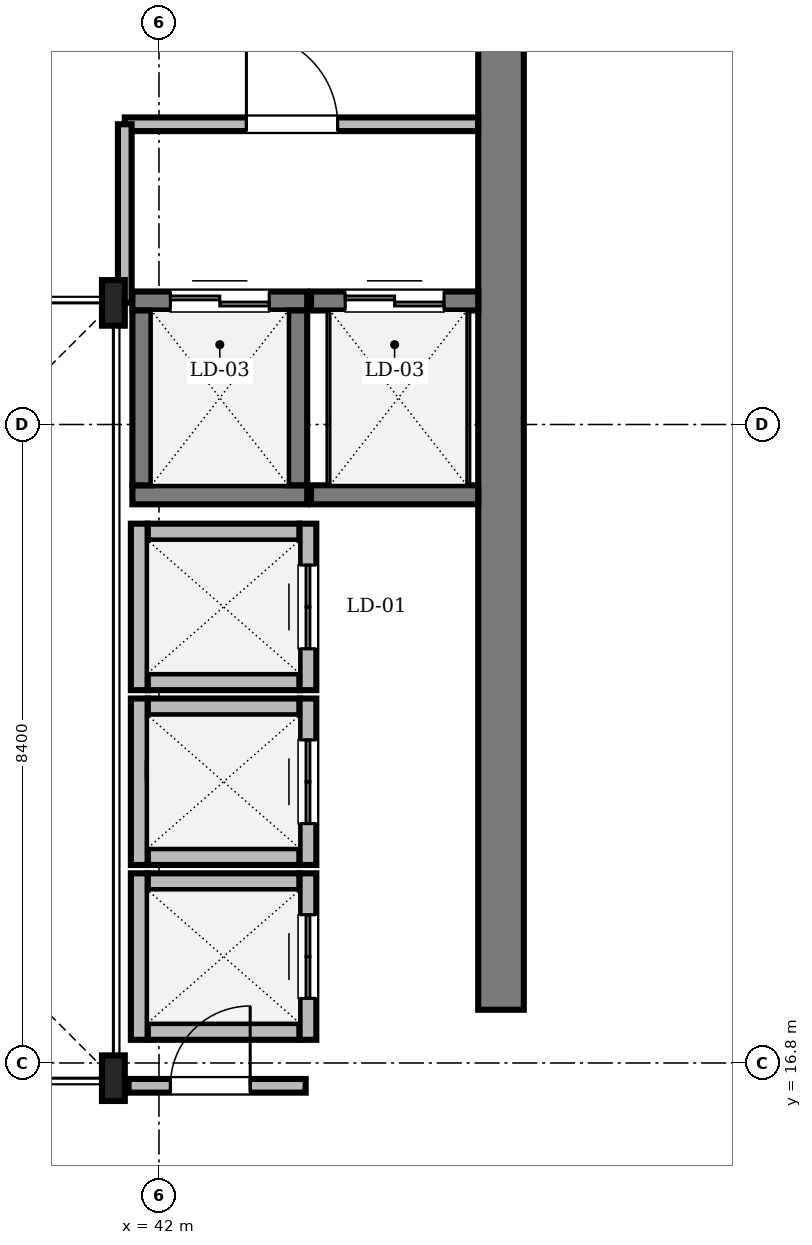
"""IFC4 building model, lengths in metres.
Left out: names, types, materials, properties, quantities, classifications, styles, units other than length and angle.
Written with IfcOpenShell. Run it as: python <this file> out.ifc"""

import sys

from ifc_helpers import new_model, si_unit, direction, frame, frame_2d, origin, origin_2d, place, context, subcontext, project, spatial, rectangle, i_section, extrude, source, transform, mapped, element, fill, save


model = new_model("IFC4")
c1 = context("Model", 3, precision=1e-05, world=origin(), true_north=direction((0.0, 1.0)))
c2 = subcontext(c1, "Body", "Model", "MODEL_VIEW")
j1 = project(units=[si_unit("LENGTHUNIT", "METRE"), si_unit("PLANEANGLEUNIT", "RADIAN")], contexts=[c1])
p1 = place(None, origin())
s1 = spatial("IfcSite", under=j1, at=p1, CompositionType="ELEMENT")
p2 = place(p1, origin())
s2 = spatial("IfcBuilding", under=s1, at=p2, CompositionType="ELEMENT")
p3 = place(p2, frame((0.0, 0.0, 262.45)))
s3 = spatial("IfcBuildingStorey", under=s2, at=p3, CompositionType="ELEMENT", Elevation=262.45)
m1 = source(origin(), c2, "Body", "SweptSolid", [
    extrude(rectangle(XDim=13.15, YDim=0.6, at=frame_2d((6.575, 0.0))), origin(), (0.0, 0.0, 1.0), 3.65),
])
p4 = place(p3, frame((46.5, 17.5, 0.0), z_axis=(0.0, 0.0, 1.0), x_axis=(0.0, 1.0, 0.0)))
e1 = element("IfcWall", 1, at=p4, inside=s3, PredefinedType="SHEAR", context=c2, shape_type="MappedRepresentation", body=[
    mapped(m1, transform((0.0, 0.0, 0.0), scale=1.0)),
])
m2 = source(origin(), c2, "Body", "SweptSolid", [
    extrude(i_section(OverallWidth=0.3, OverallDepth=0.6, WebThickness=0.015, FlangeThickness=0.03, FilletRadius=0.027, at=origin_2d()), origin(), (0.0, 0.0, 1.0), 3.65),
])
for number, where, z_axis, x_axis in (
    (2, (41.4, 16.6, 0.0), (0.0, 0.0, 1.0), (1.0, 0.0, 0.0)),
    (3, (41.4, 26.8, 0.0), (0.0, 0.0, 1.0), (1.0, 0.0, 0.0)),
):
    element("IfcColumn", number, at=place(p3, frame(where, z_axis=z_axis, x_axis=x_axis)), inside=s3, PredefinedType="COLUMN", context=c2, shape_type="MappedRepresentation", body=[
        mapped(m2, transform((0.0, 0.0, 0.0), scale=1.0)),
    ])
m3 = source(origin(), c2, "Body", "SweptSolid", [
    extrude(rectangle(XDim=2.0, YDim=0.22, at=frame_2d((1.0, 0.0))), origin(), (0.0, 0.0, 1.0), 3.65),
])
for number, where, z_axis, x_axis in (
    (4, (41.85, 21.815, 0.0), (0.0, 0.0, 1.0), (1.0, 0.0, 0.0)),
    (5, (41.85, 23.785, 0.0), (0.0, 0.0, 1.0), (1.0, 0.0, 0.0)),
):
    element("IfcWall", number, at=place(p3, frame(where, z_axis=z_axis, x_axis=x_axis)), inside=s3, PredefinedType="SOLIDWALL", context=c2, shape_type="MappedRepresentation", body=[
        mapped(m3, transform((0.0, 0.0, 0.0), scale=1.0)),
    ])
m4 = source(origin(), c2, "Body", "SweptSolid", [
    extrude(rectangle(XDim=2.19, YDim=0.22, at=frame_2d((1.095, 0.0))), origin(), (0.0, 0.0, 1.0), 3.65),
])
p5 = place(p3, frame((41.74, 21.705, 0.0), z_axis=(0.0, 0.0, 1.0), x_axis=(0.0, 1.0, 0.0)))
e6 = element("IfcWall", 6, at=p5, inside=s3, PredefinedType="SOLIDWALL", context=c2, shape_type="MappedRepresentation", body=[
    mapped(m4, transform((0.0, 0.0, 0.0), scale=1.0)),
])
p6 = place(p3, frame((43.96, 21.705, 0.0), z_axis=(0.0, 0.0, 1.0), x_axis=(0.0, 1.0, 0.0)))
e7 = element("IfcWall", 7, at=p6, inside=s3, PredefinedType="SOLIDWALL", context=c2, shape_type="MappedRepresentation", body=[
    mapped(m4, transform((0.0, 0.0, 0.0), scale=1.0)),
])
m5 = source(origin(), c2, "Body", "SweptSolid", [
    extrude(rectangle(XDim=1.1, YDim=2.2, at=frame_2d((0.55, 1.1))), frame((0.0, 0.12, 0.0), z_axis=(0.0, -1.0, 0.0), x_axis=(1.0, 0.0, 0.0)), (0.0, 0.0, 1.0), 0.24),
])
p7 = place(p6, frame((0.545, 0.0, 0.0)))
e8 = element("IfcOpeningElement", 8, at=p7, cuts=e7, PredefinedType="OPENING", context=c2, shape_type="MappedRepresentation", body=[
    mapped(m5, transform((0.0, 0.0, 0.0), scale=1.0)),
])
for number, where, z_axis, x_axis in (
    (9, (41.85, 19.515, 0.0), (0.0, 0.0, 1.0), (1.0, 0.0, 0.0)),
    (10, (41.85, 21.485, 0.0), (0.0, 0.0, 1.0), (1.0, 0.0, 0.0)),
):
    element("IfcWall", number, at=place(p3, frame(where, z_axis=z_axis, x_axis=x_axis)), inside=s3, PredefinedType="SOLIDWALL", context=c2, shape_type="MappedRepresentation", body=[
        mapped(m3, transform((0.0, 0.0, 0.0), scale=1.0)),
    ])
p8 = place(p3, frame((41.74, 19.405, 0.0), z_axis=(0.0, 0.0, 1.0), x_axis=(0.0, 1.0, 0.0)))
e11 = element("IfcWall", 11, at=p8, inside=s3, PredefinedType="SOLIDWALL", context=c2, shape_type="MappedRepresentation", body=[
    mapped(m4, transform((0.0, 0.0, 0.0), scale=1.0)),
])
p9 = place(p3, frame((43.96, 19.405, 0.0), z_axis=(0.0, 0.0, 1.0), x_axis=(0.0, 1.0, 0.0)))
e12 = element("IfcWall", 12, at=p9, inside=s3, PredefinedType="SOLIDWALL", context=c2, shape_type="MappedRepresentation", body=[
    mapped(m4, transform((0.0, 0.0, 0.0), scale=1.0)),
])
p10 = place(p9, frame((0.545, 0.0, 0.0)))
e13 = element("IfcOpeningElement", 13, at=p10, cuts=e12, PredefinedType="OPENING", context=c2, shape_type="MappedRepresentation", body=[
    mapped(m5, transform((0.0, 0.0, 0.0), scale=1.0)),
])
for number, where, z_axis, x_axis in (
    (14, (41.85, 17.215, 0.0), (0.0, 0.0, 1.0), (1.0, 0.0, 0.0)),
    (15, (41.85, 19.185, 0.0), (0.0, 0.0, 1.0), (1.0, 0.0, 0.0)),
):
    element("IfcWall", number, at=place(p3, frame(where, z_axis=z_axis, x_axis=x_axis)), inside=s3, PredefinedType="SOLIDWALL", context=c2, shape_type="MappedRepresentation", body=[
        mapped(m3, transform((0.0, 0.0, 0.0), scale=1.0)),
    ])
p11 = place(p3, frame((41.74, 17.105, 0.0), z_axis=(0.0, 0.0, 1.0), x_axis=(0.0, 1.0, 0.0)))
e16 = element("IfcWall", 16, at=p11, inside=s3, PredefinedType="SOLIDWALL", context=c2, shape_type="MappedRepresentation", body=[
    mapped(m4, transform((0.0, 0.0, 0.0), scale=1.0)),
])
p12 = place(p3, frame((43.96, 17.105, 0.0), z_axis=(0.0, 0.0, 1.0), x_axis=(0.0, 1.0, 0.0)))
e17 = element("IfcWall", 17, at=p12, inside=s3, PredefinedType="SOLIDWALL", context=c2, shape_type="MappedRepresentation", body=[
    mapped(m4, transform((0.0, 0.0, 0.0), scale=1.0)),
])
p13 = place(p12, frame((0.545, 0.0, 0.0)))
e18 = element("IfcOpeningElement", 18, at=p13, cuts=e17, PredefinedType="OPENING", context=c2, shape_type="MappedRepresentation", body=[
    mapped(m5, transform((0.0, 0.0, 0.0), scale=1.0)),
])
m6 = source(origin(), c2, "Body", "SweptSolid", [
    extrude(rectangle(XDim=2.3, YDim=0.25, at=frame_2d((1.15, 0.0))), origin(), (0.0, 0.0, 1.0), 3.65),
])
p14 = place(p3, frame((41.65, 24.275, 0.0), z_axis=(0.0, 0.0, 1.0), x_axis=(1.0, 0.0, 0.0)))
e19 = element("IfcWall", 19, at=p14, inside=s3, PredefinedType="SOLIDWALL", context=c2, shape_type="MappedRepresentation", body=[
    mapped(m6, transform((0.0, 0.0, 0.0), scale=1.0)),
])
p15 = place(p3, frame((41.65, 26.825, 0.0), z_axis=(0.0, 0.0, 1.0), x_axis=(1.0, 0.0, 0.0)))
e20 = element("IfcWall", 20, at=p15, inside=s3, PredefinedType="SOLIDWALL", context=c2, shape_type="MappedRepresentation", body=[
    mapped(m6, transform((0.0, 0.0, 0.0), scale=1.0)),
])
m7 = source(origin(), c2, "Body", "SweptSolid", [
    extrude(rectangle(XDim=1.3, YDim=2.3, at=frame_2d((0.65, 1.15))), frame((0.0, 0.135, 0.0), z_axis=(0.0, -1.0, 0.0), x_axis=(1.0, 0.0, 0.0)), (0.0, 0.0, 1.0), 0.27),
])
p16 = place(p15, frame((0.5, 0.0, 0.0)))
e21 = element("IfcOpeningElement", 21, at=p16, cuts=e20, PredefinedType="OPENING", context=c2, shape_type="MappedRepresentation", body=[
    mapped(m7, transform((0.0, 0.0, 0.0), scale=1.0)),
])
for number, where, z_axis, x_axis in (
    (22, (41.775, 24.4, 0.0), (0.0, 0.0, 1.0), (0.0, 1.0, 0.0)),
    (23, (43.825, 24.4, 0.0), (0.0, 0.0, 1.0), (0.0, 1.0, 0.0)),
):
    element("IfcWall", number, at=place(p3, frame(where, z_axis=z_axis, x_axis=x_axis)), inside=s3, PredefinedType="SOLIDWALL", context=c2, shape_type="MappedRepresentation", body=[
        mapped(m6, transform((0.0, 0.0, 0.0), scale=1.0)),
    ])
m8 = source(origin(), c2, "Body", "SweptSolid", [
    extrude(rectangle(XDim=2.2, YDim=0.25, at=frame_2d((1.1, 0.0))), origin(), (0.0, 0.0, 1.0), 3.65),
])
p17 = place(p3, frame((44.0, 24.275, 0.0), z_axis=(0.0, 0.0, 1.0), x_axis=(1.0, 0.0, 0.0)))
e24 = element("IfcWall", 24, at=p17, inside=s3, PredefinedType="SOLIDWALL", context=c2, shape_type="MappedRepresentation", body=[
    mapped(m8, transform((0.0, 0.0, 0.0), scale=1.0)),
])
p18 = place(p3, frame((44.0, 26.825, 0.0), z_axis=(0.0, 0.0, 1.0), x_axis=(1.0, 0.0, 0.0)))
e25 = element("IfcWall", 25, at=p18, inside=s3, PredefinedType="SOLIDWALL", context=c2, shape_type="MappedRepresentation", body=[
    mapped(m8, transform((0.0, 0.0, 0.0), scale=1.0)),
])
p19 = place(p18, frame((0.45, 0.0, 0.0)))
e26 = element("IfcOpeningElement", 26, at=p19, cuts=e25, PredefinedType="OPENING", context=c2, shape_type="MappedRepresentation", body=[
    mapped(m7, transform((0.0, 0.0, 0.0), scale=1.0)),
])
m9 = source(origin(), c2, "Body", "SweptSolid", [
    extrude(rectangle(XDim=4.648, YDim=0.18, at=frame_2d((2.324, 0.0))), origin(), (0.0, 0.0, 1.0), 3.282),
])
p20 = place(p3, frame((41.55, 29.15, 0.0), z_axis=(0.0, 0.0, 1.0), x_axis=(1.0, 0.0, 0.0)))
e27 = element("IfcWall", 27, at=p20, inside=s3, PredefinedType="PARTITIONING", context=c2, shape_type="MappedRepresentation", body=[
    mapped(m9, transform((0.0, 0.0, 0.0), scale=1.0)),
])
m10 = source(origin(), c2, "Body", "SweptSolid", [
    extrude(rectangle(XDim=1.2, YDim=2.2, at=frame_2d((0.6, 1.1))), frame((0.0, 0.1, 0.0), z_axis=(0.0, -1.0, 0.0), x_axis=(1.0, 0.0, 0.0)), (0.0, 0.0, 1.0), 0.2),
])
p21 = place(p20, frame((1.6, 0.0, 0.0)))
e28 = element("IfcOpeningElement", 28, at=p21, cuts=e27, PredefinedType="OPENING", context=c2, shape_type="MappedRepresentation", body=[
    mapped(m10, transform((0.0, 0.0, 0.0), scale=1.0)),
])
m11 = source(origin(), c2, "Body", "SweptSolid", [
    extrude(rectangle(XDim=2.33, YDim=0.18, at=frame_2d((1.165, 0.0))), origin(), (0.0, 0.0, 1.0), 3.092),
])
p22 = place(p3, frame((41.6, 16.5, 0.0), z_axis=(0.0, 0.0, 1.0), x_axis=(1.0, 0.0, 0.0)))
e29 = element("IfcWall", 29, at=p22, inside=s3, PredefinedType="PARTITIONING", context=c2, shape_type="MappedRepresentation", body=[
    mapped(m11, transform((0.0, 0.0, 0.0), scale=1.0)),
])
m12 = source(origin(), c2, "Body", "SweptSolid", [
    extrude(rectangle(XDim=1.05, YDim=2.2, at=frame_2d((0.525, 1.1))), frame((0.0, 0.1, 0.0), z_axis=(0.0, -1.0, 0.0), x_axis=(1.0, 0.0, 0.0)), (0.0, 0.0, 1.0), 0.2),
])
p23 = place(p22, frame((0.55, 0.0, 0.0)))
e30 = element("IfcOpeningElement", 30, at=p23, cuts=e29, PredefinedType="OPENING", context=c2, shape_type="MappedRepresentation", body=[
    mapped(m12, transform((0.0, 0.0, 0.0), scale=1.0)),
])
m13 = source(origin(), c2, "Body", "SweptSolid", [
    extrude(rectangle(XDim=2.35, YDim=0.18, at=frame_2d((1.175, 0.0))), origin(), (0.0, 0.0, 1.0), 3.282),
])
p24 = place(p3, frame((41.55, 26.8, 0.0), z_axis=(0.0, 0.0, 1.0), x_axis=(0.0, 1.0, 0.0)))
e31 = element("IfcWall", 31, at=p24, inside=s3, PredefinedType="PARTITIONING", context=c2, shape_type="MappedRepresentation", body=[
    mapped(m13, transform((0.0, 0.0, 0.0), scale=1.0)),
])
m14 = source(origin(), c2, "Body", "SweptSolid", [
    extrude(rectangle(XDim=1.858, YDim=0.18, at=frame_2d((0.929, 0.0))), origin(), (0.0, 0.0, 1.0), 3.65),
])
p25 = place(p3, frame((41.852, 20.65, 0.0), z_axis=(0.0, 0.0, 1.0), x_axis=(1.0, 0.0, 0.0)))
e32 = element("IfcWall", 32, at=p25, inside=s3, PredefinedType="PARTITIONING", context=c2, shape_type="MappedRepresentation", body=[
    mapped(m14, transform((0.0, 0.0, 0.0), scale=1.0)),
])
m15 = source(origin(), c2, "Body", "SweptSolid", [
    extrude(rectangle(XDim=1.1, YDim=2.2, at=frame_2d((0.55, 1.1))), frame((0.0, 0.025, 0.0), z_axis=(0.0, -1.0, 0.0), x_axis=(1.0, 0.0, 0.0)), (0.0, 0.0, 1.0), 0.05),
])
p26 = place(p7, origin())
e33 = element("IfcDoor", 33, at=p26, inside=s3, OperationType="DOUBLE_DOOR_SLIDING", PredefinedType="DOOR", context=c2, shape_type="MappedRepresentation", body=[
    mapped(m15, transform((0.0, 0.0, 0.0), scale=1.0)),
])
fill(e8, e33)
p27 = place(p10, origin())
e34 = element("IfcDoor", 34, at=p27, inside=s3, OperationType="DOUBLE_DOOR_SLIDING", PredefinedType="DOOR", context=c2, shape_type="MappedRepresentation", body=[
    mapped(m15, transform((0.0, 0.0, 0.0), scale=1.0)),
])
fill(e13, e34)
p28 = place(p13, origin())
e35 = element("IfcDoor", 35, at=p28, inside=s3, OperationType="DOUBLE_DOOR_SLIDING", PredefinedType="DOOR", context=c2, shape_type="MappedRepresentation", body=[
    mapped(m15, transform((0.0, 0.0, 0.0), scale=1.0)),
])
fill(e18, e35)
m16 = source(origin(), c2, "Body", "SweptSolid", [
    extrude(rectangle(XDim=1.3, YDim=2.3, at=frame_2d((0.65, 1.15))), frame((0.0, 0.025, 0.0), z_axis=(0.0, -1.0, 0.0), x_axis=(1.0, 0.0, 0.0)), (0.0, 0.0, 1.0), 0.05),
])
p29 = place(p16, origin())
e36 = element("IfcDoor", 36, at=p29, inside=s3, OperationType="DOUBLE_DOOR_SLIDING", PredefinedType="DOOR", context=c2, shape_type="MappedRepresentation", body=[
    mapped(m16, transform((0.0, 0.0, 0.0), scale=1.0)),
])
fill(e21, e36)
p30 = place(p19, origin())
e37 = element("IfcDoor", 37, at=p30, inside=s3, OperationType="DOUBLE_DOOR_SLIDING", PredefinedType="DOOR", context=c2, shape_type="MappedRepresentation", body=[
    mapped(m16, transform((0.0, 0.0, 0.0), scale=1.0)),
])
fill(e26, e37)
m17 = source(origin(), c2, "Body", "SweptSolid", [
    extrude(rectangle(XDim=1.2, YDim=2.2, at=frame_2d((0.6, 1.1))), frame((0.0, 0.025, 0.0), z_axis=(0.0, -1.0, 0.0), x_axis=(1.0, 0.0, 0.0)), (0.0, 0.0, 1.0), 0.05),
])
p31 = place(p21, origin())
e38 = element("IfcDoor", 38, at=p31, inside=s3, OperationType="SINGLE_SWING_LEFT", PredefinedType="DOOR", context=c2, shape_type="MappedRepresentation", body=[
    mapped(m17, transform((0.0, 0.0, 0.0), scale=1.0)),
])
fill(e28, e38)
m18 = source(origin(), c2, "Body", "SweptSolid", [
    extrude(rectangle(XDim=1.05, YDim=2.2, at=frame_2d((0.525, 1.1))), frame((0.0, 0.025, 0.0), z_axis=(0.0, -1.0, 0.0), x_axis=(1.0, 0.0, 0.0)), (0.0, 0.0, 1.0), 0.05),
])
p32 = place(p23, origin())
e39 = element("IfcDoor", 39, at=p32, inside=s3, OperationType="SINGLE_SWING_RIGHT", PredefinedType="DOOR", context=c2, shape_type="MappedRepresentation", body=[
    mapped(m18, transform((0.0, 0.0, 0.0), scale=1.0)),
])
fill(e30, e39)
save(model, sys.argv[1])
